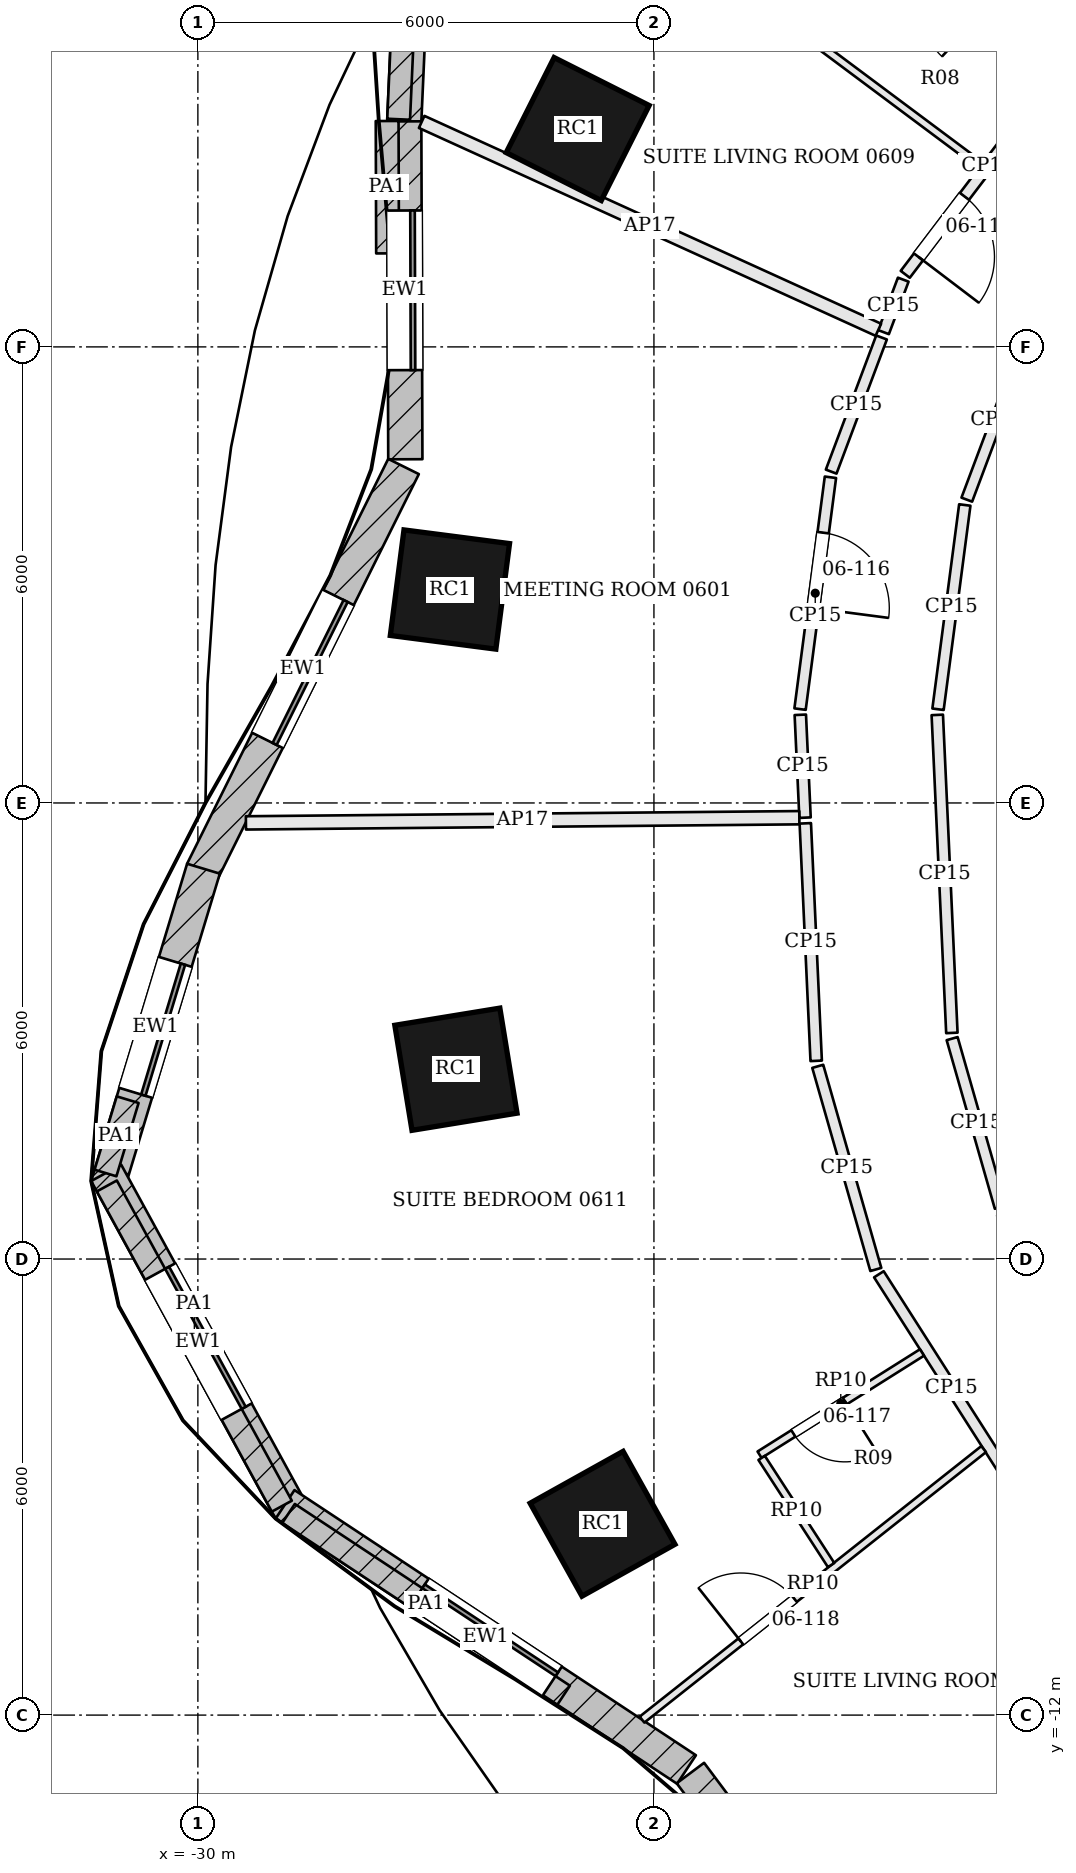
"""IFC4 building model, lengths in metres.
Left out: names, types, materials, properties, quantities, classifications, styles, units other than length and angle.
Written with IfcOpenShell. Run it as: python <this file> out.ifc"""

import sys

from ifc_helpers import new_model, si_unit, direction, frame, frame_2d, origin, origin_2d, place, context, subcontext, project, spatial, rectangle, extrude, element, fill, save


model = new_model("IFC4")
c1 = context("Model", 3, precision=1e-05, world=origin(), true_north=direction((0.0, 1.0)))
c2 = subcontext(c1, "Body", "Model", "MODEL_VIEW")
j1 = project(units=[si_unit("LENGTHUNIT", "METRE"), si_unit("PLANEANGLEUNIT", "RADIAN")], contexts=[c1])
p1 = place(None, origin())
s1 = spatial("IfcSite", under=j1, at=p1, CompositionType="ELEMENT")
p2 = place(p1, origin())
s2 = spatial("IfcBuilding", under=s1, at=p2, CompositionType="ELEMENT")
p3 = place(p2, frame((0.0, 0.0, 37.5)))
s3 = spatial("IfcBuildingStorey", under=s2, at=p3, CompositionType="ELEMENT", Elevation=37.5)
for number, where, z_axis, x_axis in (
    (1, (-25.003, 8.866, 0.0), (0.0, 0.0, 1.0), (-0.45, -0.893, 0.0)),
    (2, (-26.684, 2.808, 0.0), (0.0, 0.0, 1.0), (-0.128, -0.992, 0.0)),
    (3, (-26.605, -3.503, 0.0), (0.0, 0.0, 1.0), (0.161, -0.987, 0.0)),
    (4, (-24.676, -9.483, 0.0), (0.0, 0.0, 1.0), (0.487, -0.873, 0.0)),
):
    element("IfcColumn", number, at=place(p3, frame(where, z_axis=z_axis, x_axis=x_axis)), inside=s3, PredefinedType="COLUMN", context=c2, shape_type="SweptSolid", body=[
        extrude(rectangle(XDim=1.4, YDim=1.4, at=origin_2d()), origin(), (0.0, 0.0, 1.0), 3.6),
    ])
p4 = place(p3, frame((-27.065, 13.89, 0.0), z_axis=(0.0, 0.0, 1.0), x_axis=(-0.044544250924, -0.99900741224, 0.0)))
e5 = element("IfcWall", 5, at=p4, inside=s3, PredefinedType="SOLIDWALL", context=c2, shape_type="SweptSolid", body=[
    extrude(rectangle(XDim=4.938, YDim=0.45, at=frame_2d((2.469, 0.0))), origin(), (0.0, 0.0, 1.0), 3.4),
])
p5 = place(p4, frame((1.419, 0.0, 0.9)))
e6 = element("IfcOpeningElement", 6, at=p5, cuts=e5, PredefinedType="OPENING", context=c2, shape_type="SweptSolid", body=[
    extrude(rectangle(XDim=2.1, YDim=2.0, at=frame_2d((1.05, 1.0))), frame((0.0, 0.235, 0.0), z_axis=(0.0, -1.0, 0.0), x_axis=(1.0, 0.0, 0.0)), (0.0, 0.0, 1.0), 0.47),
])
p6 = place(p3, frame((-27.285, 8.967, 0.0), z_axis=(0.0, 0.0, 1.0), x_axis=(0.003185571797, -0.999994926053, 0.0)))
e7 = element("IfcWall", 7, at=p6, inside=s3, PredefinedType="SOLIDWALL", context=c2, shape_type="SweptSolid", body=[
    extrude(rectangle(XDim=4.445, YDim=0.45, at=frame_2d((2.223, 0.0))), origin(), (0.0, 0.0, 1.0), 3.4),
])
p7 = place(p6, frame((1.173, 0.0, 0.9)))
e8 = element("IfcOpeningElement", 8, at=p7, cuts=e7, PredefinedType="OPENING", context=c2, shape_type="SweptSolid", body=[
    extrude(rectangle(XDim=2.1, YDim=2.0, at=frame_2d((1.05, 1.0))), frame((0.0, 0.235, 0.0), z_axis=(0.0, -1.0, 0.0), x_axis=(1.0, 0.0, 0.0)), (0.0, 0.0, 1.0), 0.47),
])
p8 = place(p3, frame((-27.294, 4.427, 0.0), z_axis=(0.0, 0.0, 1.0), x_axis=(-0.444913249375, -0.895573671191, 0.0)))
e9 = element("IfcWall", 9, at=p8, inside=s3, PredefinedType="SOLIDWALL", context=c2, shape_type="SweptSolid", body=[
    extrude(rectangle(XDim=5.947, YDim=0.45, at=frame_2d((2.974, 0.0))), origin(), (0.0, 0.0, 1.0), 3.4),
])
p9 = place(p8, frame((1.924, 0.0, 0.9)))
e10 = element("IfcOpeningElement", 10, at=p9, cuts=e9, PredefinedType="OPENING", context=c2, shape_type="SweptSolid", body=[
    extrude(rectangle(XDim=2.1, YDim=2.0, at=frame_2d((1.05, 1.0))), frame((0.0, 0.235, 0.0), z_axis=(0.0, -1.0, 0.0), x_axis=(1.0, 0.0, 0.0)), (0.0, 0.0, 1.0), 0.47),
])
p10 = place(p3, frame((-29.927, -0.865, 0.0), z_axis=(0.0, 0.0, 1.0), x_axis=(-0.289432445378, -0.957198443147, 0.0)))
e11 = element("IfcWall", 11, at=p10, inside=s3, PredefinedType="SOLIDWALL", context=c2, shape_type="SweptSolid", body=[
    extrude(rectangle(XDim=4.361, YDim=0.45, at=frame_2d((2.181, 0.0))), origin(), (0.0, 0.0, 1.0), 3.4),
])
p11 = place(p10, frame((1.281, 0.0, 0.9)))
e12 = element("IfcOpeningElement", 12, at=p11, cuts=e11, PredefinedType="OPENING", context=c2, shape_type="SweptSolid", body=[
    extrude(rectangle(XDim=1.8, YDim=2.0, at=frame_2d((0.9, 1.0))), frame((0.0, 0.235, 0.0), z_axis=(0.0, -1.0, 0.0), x_axis=(1.0, 0.0, 0.0)), (0.0, 0.0, 1.0), 0.47),
])
p12 = place(p3, frame((-31.207, -4.866, 0.0), z_axis=(0.0, 0.0, 1.0), x_axis=(0.479565142605, -0.877506281458, 0.0)))
e13 = element("IfcWall", 13, at=p12, inside=s3, PredefinedType="SOLIDWALL", context=c2, shape_type="SweptSolid", body=[
    extrude(rectangle(XDim=5.061, YDim=0.45, at=frame_2d((2.53, 0.0))), origin(), (0.0, 0.0, 1.0), 3.4),
])
p13 = place(p12, frame((1.48, 0.0, 0.9)))
e14 = element("IfcOpeningElement", 14, at=p13, cuts=e13, PredefinedType="OPENING", context=c2, shape_type="SweptSolid", body=[
    extrude(rectangle(XDim=2.1, YDim=2.0, at=frame_2d((1.05, 1.0))), frame((0.0, 0.235, 0.0), z_axis=(0.0, -1.0, 0.0), x_axis=(1.0, 0.0, 0.0)), (0.0, 0.0, 1.0), 0.47),
])
p14 = place(p3, frame((-28.853, -9.227, 0.0), z_axis=(0.0, 0.0, 1.0), x_axis=(0.834404370393, -0.551152743502, 0.0)))
e15 = element("IfcWall", 15, at=p14, inside=s3, PredefinedType="SOLIDWALL", context=c2, shape_type="SweptSolid", body=[
    extrude(rectangle(XDim=6.33, YDim=0.45, at=frame_2d((3.165, 0.0))), origin(), (0.0, 0.0, 1.0), 3.4),
])
p15 = place(p14, frame((2.115, 0.0, 0.9)))
e16 = element("IfcOpeningElement", 16, at=p15, cuts=e15, PredefinedType="OPENING", context=c2, shape_type="SweptSolid", body=[
    extrude(rectangle(XDim=2.1, YDim=2.0, at=frame_2d((1.05, 1.0))), frame((0.0, 0.235, 0.0), z_axis=(0.0, -1.0, 0.0), x_axis=(1.0, 0.0, 0.0)), (0.0, 0.0, 1.0), 0.47),
])
p16 = place(p3, frame((-23.52, -12.762, 0.0), z_axis=(0.0, 0.0, 1.0), x_axis=(0.598664281495, -0.801000048728, 0.0)))
e17 = element("IfcWall", 17, at=p16, inside=s3, PredefinedType="SOLIDWALL", context=c2, shape_type="SweptSolid", body=[
    extrude(rectangle(XDim=3.482, YDim=0.45, at=frame_2d((1.741, 0.0))), origin(), (0.0, 0.0, 1.0), 3.4),
])
p17 = place(p16, frame((0.691, 0.0, 0.9)))
e18 = element("IfcOpeningElement", 18, at=p17, cuts=e17, PredefinedType="OPENING", context=c2, shape_type="SweptSolid", body=[
    extrude(rectangle(XDim=2.1, YDim=2.0, at=frame_2d((1.05, 1.0))), frame((0.0, 0.235, 0.0), z_axis=(0.0, -1.0, 0.0), x_axis=(1.0, 0.0, 0.0)), (0.0, 0.0, 1.0), 0.47),
])
p18 = place(p3, frame((-27.146, 13.757, 3.6), z_axis=(0.0, 0.0, 1.0), x_axis=(-0.044503972994, -0.999009207359, 0.0)))
e19 = element("IfcWall", 19, at=p18, inside=s3, PredefinedType="PARAPET", context=c2, shape_type="SweptSolid", body=[
    extrude(rectangle(XDim=4.767, YDim=0.3, at=frame_2d((2.384, 0.0))), origin(), (0.0, 0.0, 1.0), 1.1),
])
p19 = place(p3, frame((-27.51, 8.972, 3.6), z_axis=(0.0, 0.0, 1.0), x_axis=(0.003223981002, -0.99999480296, 0.0)))
e20 = element("IfcWall", 20, at=p19, inside=s3, PredefinedType="PARAPET", context=c2, shape_type="SweptSolid", body=[
    extrude(rectangle(XDim=1.742, YDim=0.3, at=frame_2d((0.871, 0.0))), origin(), (0.0, 0.0, 1.0), 1.1),
])
p20 = place(p3, frame((-30.924, -3.903, 3.6), z_axis=(0.0, 0.0, 1.0), x_axis=(-0.289368862089, -0.95721766681, 0.0)))
e21 = element("IfcWall", 21, at=p20, inside=s3, PredefinedType="PARAPET", context=c2, shape_type="SweptSolid", body=[
    extrude(rectangle(XDim=1.008, YDim=0.3, at=frame_2d((0.504, 0.0))), origin(), (0.0, 0.0, 1.0), 1.1),
])
p21 = place(p3, frame((-31.198, -5.039, 3.6), z_axis=(0.0, 0.0, 1.0), x_axis=(0.479564593641, -0.877506581472, 0.0)))
e22 = element("IfcWall", 22, at=p21, inside=s3, PredefinedType="PARAPET", context=c2, shape_type="SweptSolid", body=[
    extrude(rectangle(XDim=4.801, YDim=0.3, at=frame_2d((2.4, 0.0))), origin(), (0.0, 0.0, 1.0), 1.1),
])
p22 = place(p3, frame((-28.807, -9.347, 3.6), z_axis=(0.0, 0.0, 1.0), x_axis=(0.834398186729, -0.551162104995, 0.0)))
e23 = element("IfcWall", 23, at=p22, inside=s3, PredefinedType="PARAPET", context=c2, shape_type="SweptSolid", body=[
    extrude(rectangle(XDim=4.337, YDim=0.3, at=frame_2d((2.169, 0.0))), origin(), (0.0, 0.0, 1.0), 1.1),
])
p23 = place(p3, frame((-18.523, 9.811, 0.0), z_axis=(0.0, 0.0, 1.0), x_axis=(-0.605040130963, -0.796194976073, 0.0)))
e24 = element("IfcWall", 24, at=p23, inside=s3, PredefinedType="PARTITIONING", context=c2, shape_type="SweptSolid", body=[
    extrude(rectangle(XDim=3.588, YDim=0.15, at=frame_2d((1.794, 0.0))), origin(), (0.0, 0.0, 1.0), 2.68),
])
p24 = place(p23, frame((2.3, 0.0, 0.0)))
e25 = element("IfcOpeningElement", 25, at=p24, cuts=e24, PredefinedType="OPENING", context=c2, shape_type="SweptSolid", body=[
    extrude(rectangle(XDim=1.0, YDim=2.1, at=frame_2d((0.5, 1.05))), frame((0.0, 0.085, 0.0), z_axis=(0.0, -1.0, 0.0), x_axis=(1.0, 0.0, 0.0)), (0.0, 0.0, 1.0), 0.17),
])
p25 = place(p3, frame((-20.72, 6.885, 0.0), z_axis=(0.0, 0.0, 1.0), x_axis=(-0.3515587368, -0.936165826432, 0.0)))
e26 = element("IfcWall", 26, at=p25, inside=s3, PredefinedType="PARTITIONING", context=c2, shape_type="SweptSolid", body=[
    extrude(rectangle(XDim=0.738, YDim=0.15, at=frame_2d((0.369, 0.0))), origin(), (0.0, 0.0, 1.0), 2.68),
])
p26 = place(p3, frame((-27.056, 8.96, 0.0), z_axis=(0.0, 0.0, 1.0), x_axis=(0.91014850699, -0.414282144466, 0.0)))
e27 = element("IfcWall", 27, at=p26, inside=s3, PredefinedType="PARTITIONING", context=c2, shape_type="SweptSolid", body=[
    extrude(rectangle(XDim=6.602, YDim=0.175, at=frame_2d((3.301, 0.0))), origin(), (0.0, 0.0, 1.0), 2.68),
])
p27 = place(p3, frame((-21.006, 6.124, 0.0), z_axis=(0.0, 0.0, 1.0), x_axis=(-0.351520845222, -0.936180054997, 0.0)))
e28 = element("IfcWall", 28, at=p27, inside=s3, PredefinedType="PARTITIONING", context=c2, shape_type="SweptSolid", body=[
    extrude(rectangle(XDim=1.885, YDim=0.15, at=frame_2d((0.942, 0.0))), origin(), (0.0, 0.0, 1.0), 2.68),
])
p28 = place(p3, frame((-21.678, 4.285, 0.0), z_axis=(0.0, 0.0, 1.0), x_axis=(-0.129922755307, -0.991524118543, 0.0)))
e29 = element("IfcWall", 29, at=p28, inside=s3, PredefinedType="PARTITIONING", context=c2, shape_type="SweptSolid", body=[
    extrude(rectangle(XDim=3.076, YDim=0.15, at=frame_2d((1.538, 0.0))), origin(), (0.0, 0.0, 1.0), 2.68),
])
p29 = place(p28, frame((0.735, 0.0, 0.0)))
e30 = element("IfcOpeningElement", 30, at=p29, cuts=e29, PredefinedType="OPENING", context=c2, shape_type="SweptSolid", body=[
    extrude(rectangle(XDim=1.0, YDim=2.4, at=frame_2d((0.5, 1.2))), frame((0.0, 0.085, 0.0), z_axis=(0.0, -1.0, 0.0), x_axis=(1.0, 0.0, 0.0)), (0.0, 0.0, 1.0), 0.17),
])
p30 = place(p3, frame((-22.074, 1.16, 0.0), z_axis=(0.0, 0.0, 1.0), x_axis=(0.045775526754, -0.998951751162, 0.0)))
e31 = element("IfcWall", 31, at=p30, inside=s3, PredefinedType="PARTITIONING", context=c2, shape_type="SweptSolid", body=[
    extrude(rectangle(XDim=1.355, YDim=0.15, at=frame_2d((0.677, 0.0))), origin(), (0.0, 0.0, 1.0), 2.68),
])
p31 = place(p3, frame((-29.368, -0.262, 0.0), z_axis=(0.0, 0.0, 1.0), x_axis=(0.999956240095, 0.009355099959, 0.0)))
e32 = element("IfcWall", 32, at=p31, inside=s3, PredefinedType="PARTITIONING", context=c2, shape_type="SweptSolid", body=[
    extrude(rectangle(XDim=7.281, YDim=0.175, at=frame_2d((3.641, 0.0))), origin(), (0.0, 0.0, 1.0), 2.68),
])
p32 = place(p3, frame((-22.009, -0.268, 0.0), z_axis=(0.0, 0.0, 1.0), x_axis=(0.045899841803, -0.998946046853, 0.0)))
e33 = element("IfcWall", 33, at=p32, inside=s3, PredefinedType="PARTITIONING", context=c2, shape_type="SweptSolid", body=[
    extrude(rectangle(XDim=3.128, YDim=0.15, at=frame_2d((1.564, 0.0))), origin(), (0.0, 0.0, 1.0), 2.68),
])
p33 = place(p3, frame((-21.845, -3.465, 0.0), z_axis=(0.0, 0.0, 1.0), x_axis=(0.27482553005, -0.961494112323, 0.0)))
e34 = element("IfcWall", 34, at=p33, inside=s3, PredefinedType="PARTITIONING", context=c2, shape_type="SweptSolid", body=[
    extrude(rectangle(XDim=2.78, YDim=0.15, at=frame_2d((1.39, 0.0))), origin(), (0.0, 0.0, 1.0), 2.68),
])
p34 = place(p3, frame((-21.041, -6.201, 0.0), z_axis=(0.0, 0.0, 1.0), x_axis=(0.537680823918, -0.843148463552, 0.0)))
e35 = element("IfcWall", 35, at=p34, inside=s3, PredefinedType="PARTITIONING", context=c2, shape_type="SweptSolid", body=[
    extrude(rectangle(XDim=3.549, YDim=0.15, at=frame_2d((1.775, 0.0))), origin(), (0.0, 0.0, 1.0), 2.68),
])
p35 = place(p3, frame((-19.936, -13.883, 0.0), z_axis=(0.0, 0.0, 1.0), x_axis=(0.611385692276, 0.791332758882, 0.0)))
e36 = element("IfcWall", 36, at=p35, inside=s3, PredefinedType="PARTITIONING", context=c2, shape_type="SweptSolid", body=[
    extrude(rectangle(XDim=4.047, YDim=0.175, at=frame_2d((2.023, 0.0))), origin(), (0.0, 0.0, 1.0), 2.68),
])
p36 = place(p3, frame((-19.443, -5.319, 0.0), z_axis=(0.0, 0.0, 1.0), x_axis=(-0.274791002319, 0.961503980774, 0.0)))
e37 = element("IfcWall", 37, at=p36, inside=s3, PredefinedType="PARTITIONING", context=c2, shape_type="SweptSolid", body=[
    extrude(rectangle(XDim=2.307, YDim=0.15, at=frame_2d((1.154, 0.0))), origin(), (0.0, 0.0, 1.0), 2.68),
])
p37 = place(p3, frame((-20.08, -3.025, 0.0), z_axis=(0.0, 0.0, 1.0), x_axis=(-0.04581750387, 0.998949826738, 0.0)))
e38 = element("IfcWall", 38, at=p37, inside=s3, PredefinedType="PARTITIONING", context=c2, shape_type="SweptSolid", body=[
    extrude(rectangle(XDim=4.188, YDim=0.15, at=frame_2d((2.094, 0.0))), origin(), (0.0, 0.0, 1.0), 2.68),
])
p38 = place(p3, frame((-20.262, 1.233, 0.0), z_axis=(0.0, 0.0, 1.0), x_axis=(0.129897568593, 0.991527418518, 0.0)))
e39 = element("IfcWall", 39, at=p38, inside=s3, PredefinedType="PARTITIONING", context=c2, shape_type="SweptSolid", body=[
    extrude(rectangle(XDim=2.71, YDim=0.15, at=frame_2d((1.355, 0.0))), origin(), (0.0, 0.0, 1.0), 2.68),
])
p39 = place(p3, frame((-19.884, 3.99, 0.0), z_axis=(0.0, 0.0, 1.0), x_axis=(0.351423736928, 0.936216511884, 0.0)))
e40 = element("IfcWall", 40, at=p39, inside=s3, PredefinedType="PARTITIONING", context=c2, shape_type="SweptSolid", body=[
    extrude(rectangle(XDim=2.227, YDim=0.15, at=frame_2d((1.114, 0.0))), origin(), (0.0, 0.0, 1.0), 2.68),
])
p40 = place(p3, frame((-26.844, 13.716, 0.0), z_axis=(0.0, 0.0, 1.0), x_axis=(0.801519329803, -0.59796886537, 0.0)))
e41 = element("IfcWall", 41, at=p40, inside=s3, PredefinedType="PARTITIONING", context=c2, shape_type="SweptSolid", body=[
    extrude(rectangle(XDim=8.913, YDim=0.1, at=frame_2d((4.457, 0.0))), origin(), (0.0, 0.0, 1.0), 2.884),
])
p41 = place(p40, frame((4.838, 0.0, 0.0)))
e42 = element("IfcOpeningElement", 42, at=p41, cuts=e41, PredefinedType="OPENING", context=c2, shape_type="SweptSolid", body=[
    extrude(rectangle(XDim=0.9, YDim=2.4, at=frame_2d((0.45, 1.2))), frame((0.0, 0.06, 0.0), z_axis=(0.0, -1.0, 0.0), x_axis=(1.0, 0.0, 0.0)), (0.0, 0.0, 1.0), 0.12),
])
p42 = place(p3, frame((-18.787, 9.587, 0.0), z_axis=(0.0, 0.0, 1.0), x_axis=(-0.731473133424, 0.681870262645, 0.0)))
e43 = element("IfcWall", 43, at=p42, inside=s3, PredefinedType="PARTITIONING", context=c2, shape_type="SweptSolid", body=[
    extrude(rectangle(XDim=2.525, YDim=0.1, at=frame_2d((1.262, 0.0))), origin(), (0.0, 0.0, 1.0), 2.884),
])
p43 = place(p42, frame((1.2, 0.0, 0.0)))
e44 = element("IfcOpeningElement", 44, at=p43, cuts=e43, PredefinedType="OPENING", context=c2, shape_type="SweptSolid", body=[
    extrude(rectangle(XDim=0.8, YDim=2.1, at=frame_2d((0.4, 1.05))), frame((0.0, 0.06, 0.0), z_axis=(0.0, -1.0, 0.0), x_axis=(1.0, 0.0, 0.0)), (0.0, 0.0, 1.0), 0.12),
])
p44 = place(p3, frame((-24.157, -12.06, 0.0), z_axis=(0.0, 0.0, 1.0), x_axis=(0.784012147034, 0.620745481903, 0.0)))
e45 = element("IfcWall", 45, at=p44, inside=s3, PredefinedType="PARTITIONING", context=c2, shape_type="SweptSolid", body=[
    extrude(rectangle(XDim=5.733, YDim=0.1, at=frame_2d((2.867, 0.0))), origin(), (0.0, 0.0, 1.0), 2.884),
])
p45 = place(p44, frame((1.658, 0.0, 0.0)))
e46 = element("IfcOpeningElement", 46, at=p45, cuts=e45, PredefinedType="OPENING", context=c2, shape_type="SweptSolid", body=[
    extrude(rectangle(XDim=0.9, YDim=2.4, at=frame_2d((0.45, 1.2))), frame((0.0, 0.06, 0.0), z_axis=(0.0, -1.0, 0.0), x_axis=(1.0, 0.0, 0.0)), (0.0, 0.0, 1.0), 0.12),
])
p46 = place(p3, frame((-20.473, -7.229, 0.0), z_axis=(0.0, 0.0, 1.0), x_axis=(-0.846326477526, -0.532664522414, 0.0)))
e47 = element("IfcWall", 47, at=p46, inside=s3, PredefinedType="PARTITIONING", context=c2, shape_type="SweptSolid", body=[
    extrude(rectangle(XDim=2.525, YDim=0.1, at=frame_2d((1.262, 0.0))), origin(), (0.0, 0.0, 1.0), 2.884),
])
p47 = place(p46, frame((1.2, 0.0, 0.0)))
e48 = element("IfcOpeningElement", 48, at=p47, cuts=e47, PredefinedType="OPENING", context=c2, shape_type="SweptSolid", body=[
    extrude(rectangle(XDim=0.8, YDim=2.1, at=frame_2d((0.4, 1.05))), frame((0.0, 0.06, 0.0), z_axis=(0.0, -1.0, 0.0), x_axis=(1.0, 0.0, 0.0)), (0.0, 0.0, 1.0), 0.12),
])
p48 = place(p3, frame((-22.583, -8.616, 0.0), z_axis=(0.0, 0.0, 1.0), x_axis=(0.544058409866, -0.839047344703, 0.0)))
e49 = element("IfcWall", 49, at=p48, inside=s3, PredefinedType="PARTITIONING", context=c2, shape_type="SweptSolid", body=[
    extrude(rectangle(XDim=1.68, YDim=0.1, at=frame_2d((0.84, 0.0))), origin(), (0.0, 0.0, 1.0), 2.884),
])
p49 = place(p7, origin())
e50 = element("IfcWindow", 50, at=p49, inside=s3, PartitioningType="SINGLE_PANEL", PredefinedType="WINDOW", context=c2, shape_type="SweptSolid", body=[
    extrude(rectangle(XDim=2.1, YDim=2.0, at=frame_2d((1.05, 1.0))), frame((0.0, 0.135, 0.0), z_axis=(0.0, -1.0, 0.0), x_axis=(1.0, 0.0, 0.0)), (0.0, 0.0, 1.0), 0.06),
])
fill(e8, e50)
p50 = place(p9, origin())
e51 = element("IfcWindow", 51, at=p50, inside=s3, PartitioningType="SINGLE_PANEL", PredefinedType="WINDOW", context=c2, shape_type="SweptSolid", body=[
    extrude(rectangle(XDim=2.1, YDim=2.0, at=frame_2d((1.05, 1.0))), frame((0.0, 0.135, 0.0), z_axis=(0.0, -1.0, 0.0), x_axis=(1.0, 0.0, 0.0)), (0.0, 0.0, 1.0), 0.06),
])
fill(e10, e51)
p51 = place(p11, origin())
e52 = element("IfcWindow", 52, at=p51, inside=s3, PartitioningType="SINGLE_PANEL", PredefinedType="WINDOW", context=c2, shape_type="SweptSolid", body=[
    extrude(rectangle(XDim=1.8, YDim=2.0, at=frame_2d((0.9, 1.0))), frame((0.0, 0.135, 0.0), z_axis=(0.0, -1.0, 0.0), x_axis=(1.0, 0.0, 0.0)), (0.0, 0.0, 1.0), 0.06),
])
fill(e12, e52)
p52 = place(p13, origin())
e53 = element("IfcWindow", 53, at=p52, inside=s3, PartitioningType="SINGLE_PANEL", PredefinedType="WINDOW", context=c2, shape_type="SweptSolid", body=[
    extrude(rectangle(XDim=2.1, YDim=2.0, at=frame_2d((1.05, 1.0))), frame((0.0, 0.135, 0.0), z_axis=(0.0, -1.0, 0.0), x_axis=(1.0, 0.0, 0.0)), (0.0, 0.0, 1.0), 0.06),
])
fill(e14, e53)
p53 = place(p15, origin())
e54 = element("IfcWindow", 54, at=p53, inside=s3, PartitioningType="SINGLE_PANEL", PredefinedType="WINDOW", context=c2, shape_type="SweptSolid", body=[
    extrude(rectangle(XDim=2.1, YDim=2.0, at=frame_2d((1.05, 1.0))), frame((0.0, 0.135, 0.0), z_axis=(0.0, -1.0, 0.0), x_axis=(1.0, 0.0, 0.0)), (0.0, 0.0, 1.0), 0.06),
])
fill(e16, e54)
p54 = place(p24, origin())
e55 = element("IfcDoor", 55, at=p54, inside=s3, OperationType="SINGLE_SWING_RIGHT", PredefinedType="DOOR", context=c2, shape_type="SweptSolid", body=[
    extrude(rectangle(XDim=1.0, YDim=2.1, at=frame_2d((0.5, 1.05))), frame((0.0, 0.025, 0.0), z_axis=(0.0, -1.0, 0.0), x_axis=(1.0, 0.0, 0.0)), (0.0, 0.0, 1.0), 0.05),
])
fill(e25, e55)
p55 = place(p29, origin())
e56 = element("IfcDoor", 56, at=p55, inside=s3, OperationType="SINGLE_SWING_RIGHT", PredefinedType="DOOR", context=c2, shape_type="SweptSolid", body=[
    extrude(rectangle(XDim=1.0, YDim=2.4, at=frame_2d((0.5, 1.2))), frame((0.0, 0.025, 0.0), z_axis=(0.0, -1.0, 0.0), x_axis=(1.0, 0.0, 0.0)), (0.0, 0.0, 1.0), 0.05),
])
fill(e30, e56)
p56 = place(p47, origin())
e57 = element("IfcDoor", 57, at=p56, inside=s3, OperationType="SINGLE_SWING_LEFT", PredefinedType="DOOR", context=c2, shape_type="SweptSolid", body=[
    extrude(rectangle(XDim=0.8, YDim=2.1, at=frame_2d((0.4, 1.05))), frame((0.0, 0.025, 0.0), z_axis=(0.0, -1.0, 0.0), x_axis=(1.0, 0.0, 0.0)), (0.0, 0.0, 1.0), 0.05),
])
fill(e48, e57)
p57 = place(p45, origin())
e58 = element("IfcDoor", 58, at=p57, inside=s3, OperationType="SINGLE_SWING_LEFT", PredefinedType="DOOR", context=c2, shape_type="SweptSolid", body=[
    extrude(rectangle(XDim=0.9, YDim=2.4, at=frame_2d((0.45, 1.2))), frame((0.0, 0.025, 0.0), z_axis=(0.0, -1.0, 0.0), x_axis=(1.0, 0.0, 0.0)), (0.0, 0.0, 1.0), 0.05),
])
fill(e46, e58)
save(model, sys.argv[1])
